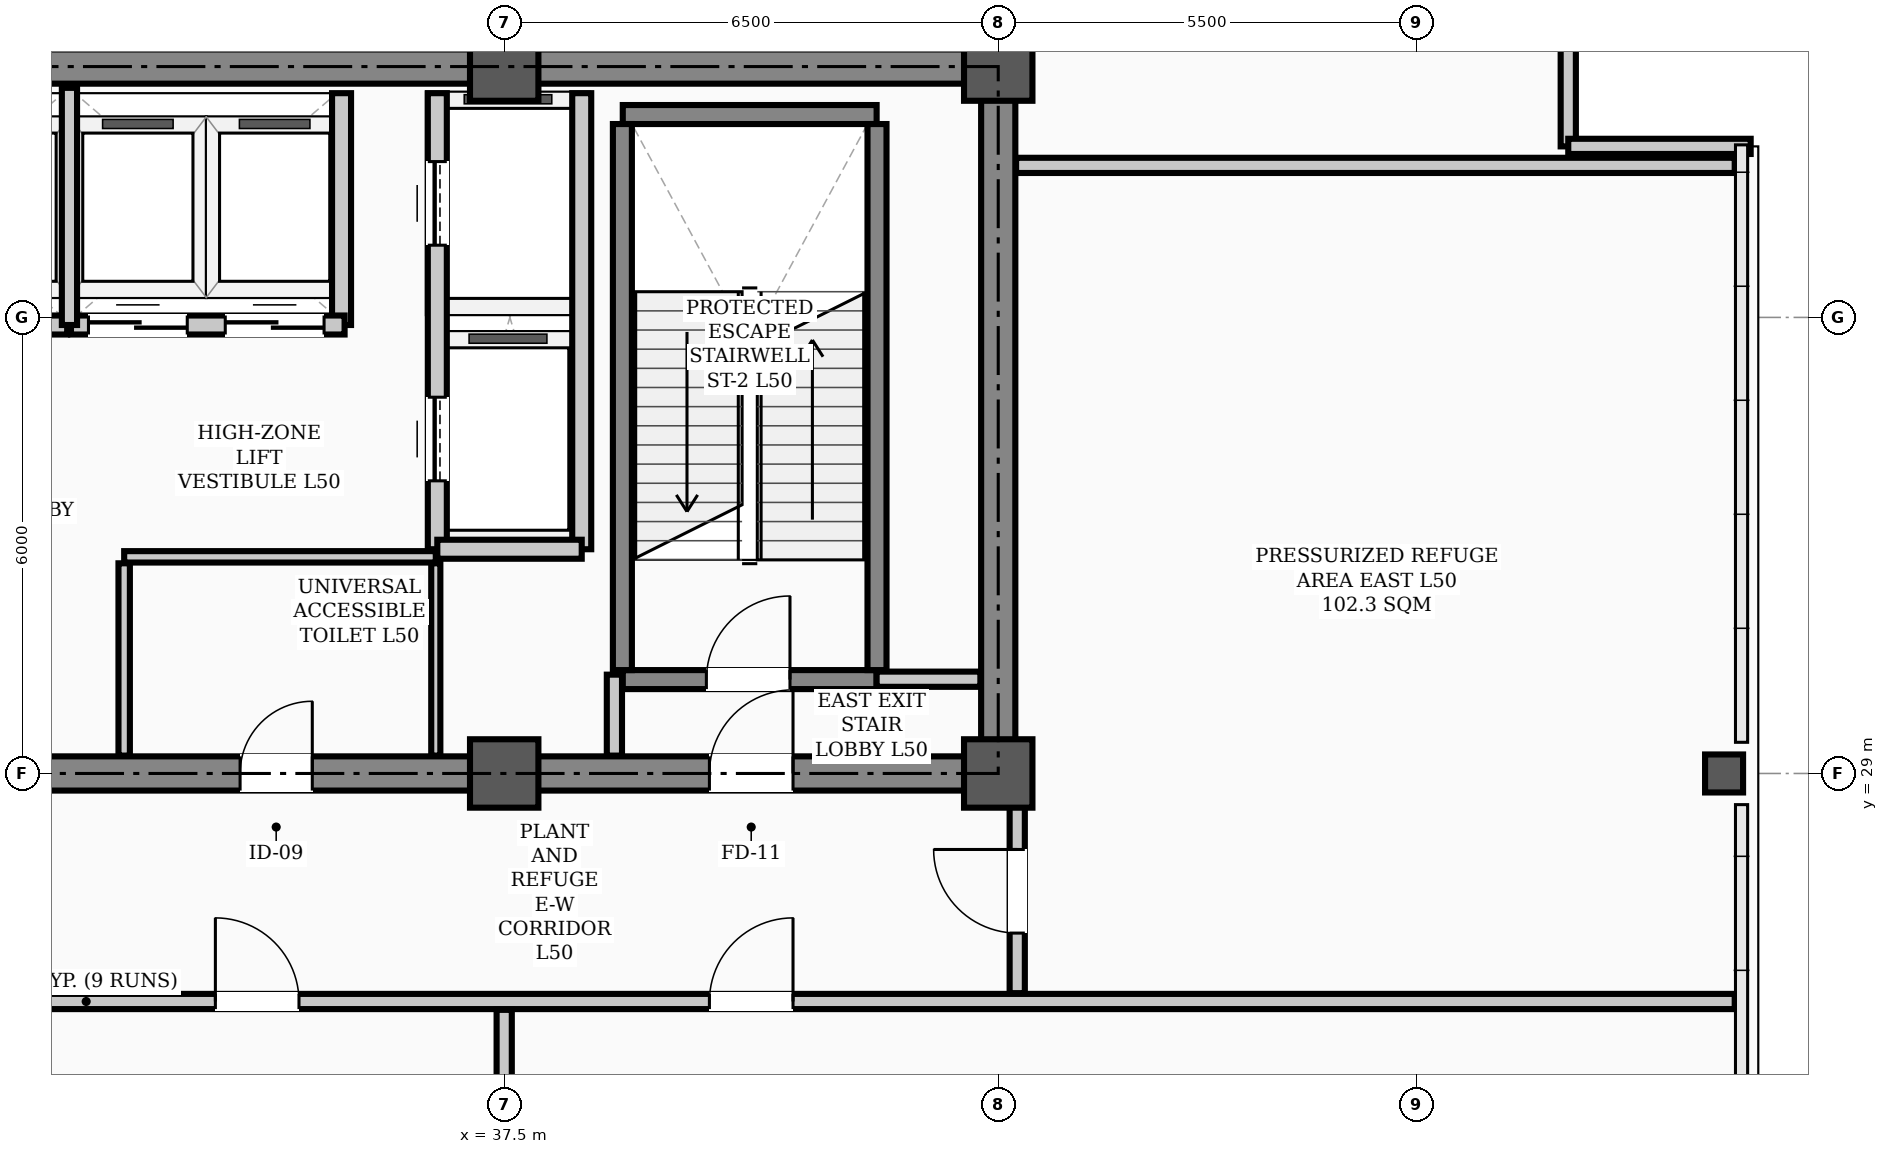
"""IFC4 building model, lengths in metres.
Left out: names, types, materials, properties, quantities, classifications, styles, units other than length and angle.
Written with IfcOpenShell. Run it as: python <this file> out.ifc"""

import sys

from ifc_helpers import new_model, si_unit, direction, frame, frame_2d, origin, origin_2d, place, context, subcontext, project, spatial, rectangle, hollow_rectangle, extrude, element, fill, save


model = new_model("IFC4")
c1 = context("Model", 3, precision=1e-05, world=origin(), true_north=direction((0.0, 1.0)))
c2 = subcontext(c1, "Body", "Model", "MODEL_VIEW")
j1 = project(units=[si_unit("LENGTHUNIT", "METRE"), si_unit("PLANEANGLEUNIT", "RADIAN")], contexts=[c1])
p1 = place(None, origin())
s1 = spatial("IfcSite", under=j1, at=p1, CompositionType="ELEMENT")
p2 = place(p1, origin())
s2 = spatial("IfcBuilding", under=s1, at=p2, CompositionType="ELEMENT")
p3 = place(p2, frame((0.0, 0.0, 200.7)))
s3 = spatial("IfcBuildingStorey", under=s2, at=p3, CompositionType="ELEMENT", Elevation=200.7)
for number, where, z_axis, x_axis in (
    (1, (37.5, 29.0, 0.0), (0.0, 0.0, 1.0), (1.0, 0.0, 0.0)),
    (2, (37.5, 38.3, 0.0), (0.0, 0.0, 1.0), (1.0, 0.0, 0.0)),
    (3, (44.0, 29.0, 0.0), (0.0, 0.0, 1.0), (1.0, 0.0, 0.0)),
    (4, (44.0, 38.3, 0.0), (0.0, 0.0, 1.0), (1.0, 0.0, 0.0)),
):
    element("IfcColumn", number, at=place(p3, frame(where, z_axis=z_axis, x_axis=x_axis)), inside=s3, PredefinedType="COLUMN", context=c2, shape_type="SweptSolid", body=[
        extrude(hollow_rectangle(XDim=0.9, YDim=0.9, WallThickness=0.035, InnerFilletRadius=0.017, OuterFilletRadius=0.052, at=origin_2d()), origin(), (0.0, 0.0, 1.0), 5.4),
    ])
p4 = place(p3, frame((53.55, 29.0, 0.0), z_axis=(0.0, 0.0, 1.0), x_axis=(1.0, 0.0, 0.0)))
e5 = element("IfcColumn", 5, at=p4, inside=s3, PredefinedType="COLUMN", context=c2, shape_type="SweptSolid", body=[
    extrude(hollow_rectangle(XDim=0.5, YDim=0.5, WallThickness=0.024, InnerFilletRadius=0.012, OuterFilletRadius=0.036, at=origin_2d()), origin(), (0.0, 0.0, 1.0), 5.4),
])
for number, where, z_axis, x_axis in (
    (6, (51.5, 39.65, 0.0), (0.0, 0.0, 1.0), (0.0, -1.0, 0.0)),
    (7, (51.5, 37.25, 0.0), (0.0, 0.0, 1.0), (1.0, 0.0, 0.0)),
):
    element("IfcWall", number, at=place(p3, frame(where, z_axis=z_axis, x_axis=x_axis)), inside=s3, PredefinedType="PARAPET", context=c2, shape_type="SweptSolid", body=[
        extrude(rectangle(XDim=2.4, YDim=0.2, at=frame_2d((1.2, 0.0))), origin(), (0.0, 0.0, 1.0), 1.2),
    ])
p5 = place(p3, frame((13.5, 29.0, 0.0), z_axis=(0.0, 0.0, 1.0), x_axis=(1.0, 0.0, 0.0)))
e8 = element("IfcWall", 8, at=p5, inside=s3, PredefinedType="SHEAR", context=c2, shape_type="SweptSolid", body=[
    extrude(rectangle(XDim=30.5, YDim=0.45, at=frame_2d((15.25, 0.0))), origin(), (0.0, 0.0, 1.0), 5.22),
])
p6 = place(p5, frame((1.75, 0.0, 0.0)))
e9 = element("IfcOpeningElement", 9, at=p6, cuts=e8, PredefinedType="OPENING", context=c2, shape_type="SweptSolid", body=[
    extrude(rectangle(XDim=1.1, YDim=2.08, at=frame_2d((0.55, 1.04))), frame((0.0, 0.235, 0.0), z_axis=(0.0, -1.0, 0.0), x_axis=(1.0, 0.0, 0.0)), (0.0, 0.0, 1.0), 0.47),
])
p7 = place(p5, frame((26.7, 0.0, 0.0)))
e10 = element("IfcOpeningElement", 10, at=p7, cuts=e8, PredefinedType="OPENING", context=c2, shape_type="SweptSolid", body=[
    extrude(rectangle(XDim=1.1, YDim=2.08, at=frame_2d((0.55, 1.04))), frame((0.0, 0.235, 0.0), z_axis=(0.0, -1.0, 0.0), x_axis=(1.0, 0.0, 0.0)), (0.0, 0.0, 1.0), 0.47),
])
p8 = place(p5, frame((6.8, 0.0, 0.0)))
e11 = element("IfcOpeningElement", 11, at=p8, cuts=e8, PredefinedType="OPENING", context=c2, shape_type="SweptSolid", body=[
    extrude(rectangle(XDim=1.1, YDim=2.08, at=frame_2d((0.55, 1.04))), frame((0.0, 0.235, 0.0), z_axis=(0.0, -1.0, 0.0), x_axis=(1.0, 0.0, 0.0)), (0.0, 0.0, 1.0), 0.47),
])
p9 = place(p5, frame((13.2, 0.0, 0.0)))
e12 = element("IfcOpeningElement", 12, at=p9, cuts=e8, PredefinedType="OPENING", context=c2, shape_type="SweptSolid", body=[
    extrude(rectangle(XDim=1.6, YDim=2.08, at=frame_2d((0.8, 1.04))), frame((0.0, 0.235, 0.0), z_axis=(0.0, -1.0, 0.0), x_axis=(1.0, 0.0, 0.0)), (0.0, 0.0, 1.0), 0.47),
])
p10 = place(p5, frame((20.525, 0.0, 0.0)))
e13 = element("IfcOpeningElement", 13, at=p10, cuts=e8, PredefinedType="OPENING", context=c2, shape_type="SweptSolid", body=[
    extrude(rectangle(XDim=0.95, YDim=2.08, at=frame_2d((0.475, 1.04))), frame((0.0, 0.235, 0.0), z_axis=(0.0, -1.0, 0.0), x_axis=(1.0, 0.0, 0.0)), (0.0, 0.0, 1.0), 0.47),
])
p11 = place(p3, frame((13.5, 38.3, 0.0), z_axis=(0.0, 0.0, 1.0), x_axis=(1.0, 0.0, 0.0)))
e14 = element("IfcWall", 14, at=p11, inside=s3, PredefinedType="SHEAR", context=c2, shape_type="SweptSolid", body=[
    extrude(rectangle(XDim=30.5, YDim=0.45, at=frame_2d((15.25, 0.0))), origin(), (0.0, 0.0, 1.0), 5.22),
])
p12 = place(p3, frame((44.0, 29.35, 0.0), z_axis=(0.0, 0.0, 1.0), x_axis=(0.0, 1.0, 0.0)))
e15 = element("IfcWall", 15, at=p12, inside=s3, PredefinedType="SHEAR", context=c2, shape_type="SweptSolid", body=[
    extrude(rectangle(XDim=8.6, YDim=0.45, at=frame_2d((4.3, 0.0))), origin(), (0.0, 0.0, 1.0), 5.22),
])
p13 = place(p3, frame((39.06, 30.235, 0.0), z_axis=(0.0, 0.0, 1.0), x_axis=(1.0, 0.0, 0.0)))
e16 = element("IfcWall", 16, at=p13, inside=s3, PredefinedType="STANDARD", context=c2, shape_type="SweptSolid", body=[
    extrude(rectangle(XDim=3.34, YDim=0.25, at=frame_2d((1.67, 0.0))), origin(), (0.0, 0.0, 1.0), 5.22),
])
p14 = place(p13, frame((1.1, 0.0, 0.0)))
e17 = element("IfcOpeningElement", 17, at=p14, cuts=e16, PredefinedType="OPENING", context=c2, shape_type="SweptSolid", body=[
    extrude(rectangle(XDim=1.1, YDim=2.08, at=frame_2d((0.55, 1.04))), frame((0.0, 0.135, 0.0), z_axis=(0.0, -1.0, 0.0), x_axis=(1.0, 0.0, 0.0)), (0.0, 0.0, 1.0), 0.27),
])
p15 = place(p3, frame((39.06, 37.669, 0.0), z_axis=(0.0, 0.0, 1.0), x_axis=(1.0, 0.0, 0.0)))
e18 = element("IfcWall", 18, at=p15, inside=s3, PredefinedType="STANDARD", context=c2, shape_type="SweptSolid", body=[
    extrude(rectangle(XDim=3.34, YDim=0.25, at=frame_2d((1.67, 0.0))), origin(), (0.0, 0.0, 1.0), 5.22),
])
for number, where, z_axis, x_axis in (
    (19, (39.055, 30.36, 0.0), (0.0, 0.0, 1.0), (0.0, 1.0, 0.0)),
    (20, (42.405, 30.36, 0.0), (0.0, 0.0, 1.0), (0.0, 1.0, 0.0)),
):
    element("IfcWall", number, at=place(p3, frame(where, z_axis=z_axis, x_axis=x_axis)), inside=s3, PredefinedType="STANDARD", context=c2, shape_type="SweptSolid", body=[
        extrude(rectangle(XDim=7.184, YDim=0.25, at=frame_2d((3.592, 0.0))), origin(), (0.0, 0.0, 1.0), 5.22),
    ])
p16 = place(p3, frame((36.62, 31.95, 0.0), z_axis=(0.0, 0.0, 1.0), x_axis=(0.0, 1.0, 0.0)))
e21 = element("IfcWall", 21, at=p16, inside=s3, PredefinedType="STANDARD", context=c2, shape_type="SweptSolid", body=[
    extrude(rectangle(XDim=6.0, YDim=0.25, at=frame_2d((3.0, 0.0))), origin(), (0.0, 0.0, 1.0), 5.22),
])
p17 = place(p16, frame((0.9, 0.0, 0.0)))
e22 = element("IfcOpeningElement", 22, at=p17, cuts=e21, PredefinedType="OPENING", context=c2, shape_type="SweptSolid", body=[
    extrude(rectangle(XDim=1.1, YDim=2.08, at=frame_2d((0.55, 1.04))), frame((0.0, 0.135, 0.0), z_axis=(0.0, -1.0, 0.0), x_axis=(1.0, 0.0, 0.0)), (0.0, 0.0, 1.0), 0.27),
])
p18 = place(p16, frame((4.0, 0.0, 0.0)))
e23 = element("IfcOpeningElement", 23, at=p18, cuts=e21, PredefinedType="OPENING", context=c2, shape_type="SweptSolid", body=[
    extrude(rectangle(XDim=1.1, YDim=2.08, at=frame_2d((0.55, 1.04))), frame((0.0, 0.135, 0.0), z_axis=(0.0, -1.0, 0.0), x_axis=(1.0, 0.0, 0.0)), (0.0, 0.0, 1.0), 0.27),
])
p19 = place(p3, frame((38.52, 31.95, 0.0), z_axis=(0.0, 0.0, 1.0), x_axis=(0.0, 1.0, 0.0)))
e24 = element("IfcWall", 24, at=p19, inside=s3, PredefinedType="STANDARD", context=c2, shape_type="SweptSolid", body=[
    extrude(rectangle(XDim=6.0, YDim=0.25, at=frame_2d((3.0, 0.0))), origin(), (0.0, 0.0, 1.0), 4.98),
])
p20 = place(p3, frame((36.62, 31.95, 0.0), z_axis=(0.0, 0.0, 1.0), x_axis=(1.0, 0.0, 0.0)))
e25 = element("IfcWall", 25, at=p20, inside=s3, PredefinedType="STANDARD", context=c2, shape_type="SweptSolid", body=[
    extrude(rectangle(XDim=1.9, YDim=0.25, at=frame_2d((0.95, 0.0))), origin(), (0.0, 0.0, 1.0), 4.98),
])
p21 = place(p3, frame((35.36, 34.9, 0.0), z_axis=(0.0, 0.0, 1.0), x_axis=(0.0, 1.0, 0.0)))
e26 = element("IfcWall", 26, at=p21, inside=s3, PredefinedType="STANDARD", context=c2, shape_type="SweptSolid", body=[
    extrude(rectangle(XDim=3.05, YDim=0.25, at=frame_2d((1.525, 0.0))), origin(), (0.0, 0.0, 1.0), 5.22),
])
p22 = place(p3, frame((28.2, 34.9, 0.0), z_axis=(0.0, 0.0, 1.0), x_axis=(1.0, 0.0, 0.0)))
e27 = element("IfcWall", 27, at=p22, inside=s3, PredefinedType="STANDARD", context=c2, shape_type="SweptSolid", body=[
    extrude(rectangle(XDim=3.55, YDim=0.25, at=frame_2d((1.775, 0.0))), origin(), (0.0, 0.0, 1.0), 5.22),
])
p23 = place(p22, frame((0.23, 0.0, 0.0)))
e28 = element("IfcOpeningElement", 28, at=p23, cuts=e27, PredefinedType="OPENING", context=c2, shape_type="SweptSolid", body=[
    extrude(rectangle(XDim=1.3, YDim=2.08, at=frame_2d((0.65, 1.04))), frame((0.0, 0.135, 0.0), z_axis=(0.0, -1.0, 0.0), x_axis=(1.0, 0.0, 0.0)), (0.0, 0.0, 1.0), 0.27),
])
p24 = place(p22, frame((2.03, 0.0, 0.0)))
e29 = element("IfcOpeningElement", 29, at=p24, cuts=e27, PredefinedType="OPENING", context=c2, shape_type="SweptSolid", body=[
    extrude(rectangle(XDim=1.3, YDim=2.08, at=frame_2d((0.65, 1.04))), frame((0.0, 0.135, 0.0), z_axis=(0.0, -1.0, 0.0), x_axis=(1.0, 0.0, 0.0)), (0.0, 0.0, 1.0), 0.27),
])
p25 = place(p3, frame((31.8, 34.9, 0.0), z_axis=(0.0, 0.0, 1.0), x_axis=(1.0, 0.0, 0.0)))
e30 = element("IfcWall", 30, at=p25, inside=s3, PredefinedType="STANDARD", context=c2, shape_type="SweptSolid", body=[
    extrude(rectangle(XDim=3.6, YDim=0.25, at=frame_2d((1.8, 0.0))), origin(), (0.0, 0.0, 1.0), 5.22),
])
p26 = place(p25, frame((0.23, 0.0, 0.0)))
e31 = element("IfcOpeningElement", 31, at=p26, cuts=e30, PredefinedType="OPENING", context=c2, shape_type="SweptSolid", body=[
    extrude(rectangle(XDim=1.3, YDim=2.08, at=frame_2d((0.65, 1.04))), frame((0.0, 0.135, 0.0), z_axis=(0.0, -1.0, 0.0), x_axis=(1.0, 0.0, 0.0)), (0.0, 0.0, 1.0), 0.27),
])
p27 = place(p25, frame((2.03, 0.0, 0.0)))
e32 = element("IfcOpeningElement", 32, at=p27, cuts=e30, PredefinedType="OPENING", context=c2, shape_type="SweptSolid", body=[
    extrude(rectangle(XDim=1.3, YDim=2.08, at=frame_2d((0.65, 1.04))), frame((0.0, 0.135, 0.0), z_axis=(0.0, -1.0, 0.0), x_axis=(1.0, 0.0, 0.0)), (0.0, 0.0, 1.0), 0.27),
])
p28 = place(p3, frame((42.4, 30.24, 0.0), z_axis=(0.0, 0.0, 1.0), x_axis=(1.0, 0.0, 0.0)))
e33 = element("IfcWall", 33, at=p28, inside=s3, PredefinedType="STANDARD", context=c2, shape_type="SweptSolid", body=[
    extrude(rectangle(XDim=1.365, YDim=0.2, at=frame_2d((0.683, 0.0))), origin(), (0.0, 0.0, 1.0), 4.7),
])
p29 = place(p3, frame((32.5, 31.85, 0.0), z_axis=(0.0, 0.0, 1.0), x_axis=(1.0, 0.0, 0.0)))
e34 = element("IfcWall", 34, at=p29, inside=s3, PredefinedType="PARTITIONING", context=c2, shape_type="SweptSolid", body=[
    extrude(rectangle(XDim=4.1, YDim=0.15, at=frame_2d((2.05, 0.0))), origin(), (0.0, 0.0, 1.0), 5.22),
])
p30 = place(p3, frame((10.31, 26.0, 0.0), z_axis=(0.0, 0.0, 1.0), x_axis=(1.0, 0.0, 0.0)))
e35 = element("IfcWall", 35, at=p30, inside=s3, PredefinedType="STANDARD", context=c2, shape_type="SweptSolid", body=[
    extrude(rectangle(XDim=43.38, YDim=0.2, at=frame_2d((21.69, 0.0))), origin(), (0.0, 0.0, 1.0), 4.7),
])
p31 = place(p30, frame((8.34, 0.0, 0.0)))
e36 = element("IfcOpeningElement", 36, at=p31, cuts=e35, PredefinedType="OPENING", context=c2, shape_type="SweptSolid", body=[
    extrude(rectangle(XDim=1.1, YDim=2.08, at=frame_2d((0.55, 1.04))), frame((0.0, 0.11, 0.0), z_axis=(0.0, -1.0, 0.0), x_axis=(1.0, 0.0, 0.0)), (0.0, 0.0, 1.0), 0.22),
])
p32 = place(p30, frame((16.39, 0.0, 0.0)))
e37 = element("IfcOpeningElement", 37, at=p32, cuts=e35, PredefinedType="OPENING", context=c2, shape_type="SweptSolid", body=[
    extrude(rectangle(XDim=1.6, YDim=2.08, at=frame_2d((0.8, 1.04))), frame((0.0, 0.11, 0.0), z_axis=(0.0, -1.0, 0.0), x_axis=(1.0, 0.0, 0.0)), (0.0, 0.0, 1.0), 0.22),
])
p33 = place(p30, frame((23.39, 0.0, 0.0)))
e38 = element("IfcOpeningElement", 38, at=p33, cuts=e35, PredefinedType="OPENING", context=c2, shape_type="SweptSolid", body=[
    extrude(rectangle(XDim=1.1, YDim=2.08, at=frame_2d((0.55, 1.04))), frame((0.0, 0.11, 0.0), z_axis=(0.0, -1.0, 0.0), x_axis=(1.0, 0.0, 0.0)), (0.0, 0.0, 1.0), 0.22),
])
p34 = place(p30, frame((29.89, 0.0, 0.0)))
e39 = element("IfcOpeningElement", 39, at=p34, cuts=e35, PredefinedType="OPENING", context=c2, shape_type="SweptSolid", body=[
    extrude(rectangle(XDim=1.1, YDim=2.08, at=frame_2d((0.55, 1.04))), frame((0.0, 0.11, 0.0), z_axis=(0.0, -1.0, 0.0), x_axis=(1.0, 0.0, 0.0)), (0.0, 0.0, 1.0), 0.22),
])
p35 = place(p3, frame((44.235, 37.0, 0.0), z_axis=(0.0, 0.0, 1.0), x_axis=(1.0, 0.0, 0.0)))
e40 = element("IfcWall", 40, at=p35, inside=s3, PredefinedType="STANDARD", context=c2, shape_type="SweptSolid", body=[
    extrude(rectangle(XDim=9.455, YDim=0.2, at=frame_2d((4.728, 0.0))), origin(), (0.0, 0.0, 1.0), 4.7),
])
p36 = place(p3, frame((38.95, 29.235, 0.0), z_axis=(0.0, 0.0, 1.0), x_axis=(0.0, 1.0, 0.0)))
e41 = element("IfcWall", 41, at=p36, inside=s3, PredefinedType="STANDARD", context=c2, shape_type="SweptSolid", body=[
    extrude(rectangle(XDim=1.065, YDim=0.2, at=frame_2d((0.532, 0.0))), origin(), (0.0, 0.0, 1.0), 4.85),
])
p37 = place(p3, frame((32.5, 29.235, 0.0), z_axis=(0.0, 0.0, 1.0), x_axis=(0.0, 1.0, 0.0)))
e42 = element("IfcWall", 42, at=p37, inside=s3, PredefinedType="PARTITIONING", context=c2, shape_type="SweptSolid", body=[
    extrude(rectangle(XDim=2.53, YDim=0.15, at=frame_2d((1.265, 0.0))), origin(), (0.0, 0.0, 1.0), 4.85),
])
p38 = place(p3, frame((36.6, 29.235, 0.0), z_axis=(0.0, 0.0, 1.0), x_axis=(0.0, 1.0, 0.0)))
e43 = element("IfcWall", 43, at=p38, inside=s3, PredefinedType="PARTITIONING", context=c2, shape_type="SweptSolid", body=[
    extrude(rectangle(XDim=2.53, YDim=0.12, at=frame_2d((1.265, 0.0))), origin(), (0.0, 0.0, 1.0), 4.85),
])
p39 = place(p3, frame((44.25, 26.11, 0.0), z_axis=(0.0, 0.0, 1.0), x_axis=(0.0, 1.0, 0.0)))
e44 = element("IfcWall", 44, at=p39, inside=s3, PredefinedType="STANDARD", context=c2, shape_type="SweptSolid", body=[
    extrude(rectangle(XDim=3.24, YDim=0.2, at=frame_2d((1.62, 0.0))), origin(), (0.0, 0.0, 1.0), 4.6),
])
p40 = place(p39, frame((0.79, 0.0, 0.0)))
e45 = element("IfcOpeningElement", 45, at=p40, cuts=e44, PredefinedType="OPENING", context=c2, shape_type="SweptSolid", body=[
    extrude(rectangle(XDim=1.1, YDim=2.08, at=frame_2d((0.55, 1.04))), frame((0.0, 0.11, 0.0), z_axis=(0.0, -1.0, 0.0), x_axis=(1.0, 0.0, 0.0)), (0.0, 0.0, 1.0), 0.22),
])
p41 = place(p3, frame((37.5, 11.56, 0.0), z_axis=(0.0, 0.0, 1.0), x_axis=(0.0, 1.0, 0.0)))
e46 = element("IfcWall", 46, at=p41, inside=s3, PredefinedType="STANDARD", context=c2, shape_type="SweptSolid", body=[
    extrude(rectangle(XDim=14.33, YDim=0.2, at=frame_2d((7.165, 0.0))), origin(), (0.0, 0.0, 1.0), 4.6),
])
p42 = place(p3, frame((31.78, 34.9, 0.0), z_axis=(0.0, 0.0, 1.0), x_axis=(0.0, 1.0, 0.0)))
e47 = element("IfcWall", 47, at=p42, inside=s3, PredefinedType="STANDARD", context=c2, shape_type="SweptSolid", body=[
    extrude(rectangle(XDim=3.12, YDim=0.2, at=frame_2d((1.56, 0.0))), origin(), (0.0, 0.0, 1.0), 5.22),
])
p43 = place(p14, origin())
e48 = element("IfcDoor", 48, at=p43, inside=s3, OperationType="SINGLE_SWING_RIGHT", PredefinedType="DOOR", context=c2, shape_type="SweptSolid", body=[
    extrude(rectangle(XDim=1.1, YDim=2.08, at=frame_2d((0.55, 1.04))), frame((0.0, 0.025, 0.0), z_axis=(0.0, -1.0, 0.0), x_axis=(1.0, 0.0, 0.0)), (0.0, 0.0, 1.0), 0.05),
])
fill(e17, e48)
p44 = place(p7, origin())
e49 = element("IfcDoor", 49, at=p44, inside=s3, OperationType="SINGLE_SWING_RIGHT", PredefinedType="DOOR", context=c2, shape_type="SweptSolid", body=[
    extrude(rectangle(XDim=1.1, YDim=2.08, at=frame_2d((0.55, 1.04))), frame((0.0, 0.025, 0.0), z_axis=(0.0, -1.0, 0.0), x_axis=(1.0, 0.0, 0.0)), (0.0, 0.0, 1.0), 0.05),
])
fill(e10, e49)
p45 = place(p10, origin())
e50 = element("IfcDoor", 50, at=p45, inside=s3, OperationType="SINGLE_SWING_RIGHT", PredefinedType="DOOR", context=c2, shape_type="SweptSolid", body=[
    extrude(rectangle(XDim=0.95, YDim=2.08, at=frame_2d((0.475, 1.04))), frame((0.0, 0.025, 0.0), z_axis=(0.0, -1.0, 0.0), x_axis=(1.0, 0.0, 0.0)), (0.0, 0.0, 1.0), 0.05),
])
fill(e13, e50)
p46 = place(p40, origin())
e51 = element("IfcDoor", 51, at=p46, inside=s3, OperationType="SINGLE_SWING_RIGHT", PredefinedType="DOOR", context=c2, shape_type="SweptSolid", body=[
    extrude(rectangle(XDim=1.1, YDim=2.08, at=frame_2d((0.55, 1.04))), frame((0.0, 0.025, 0.0), z_axis=(0.0, -1.0, 0.0), x_axis=(1.0, 0.0, 0.0)), (0.0, 0.0, 1.0), 0.05),
])
fill(e45, e51)
p47 = place(p33, origin())
e52 = element("IfcDoor", 52, at=p47, inside=s3, OperationType="SINGLE_SWING_LEFT", PredefinedType="DOOR", context=c2, shape_type="SweptSolid", body=[
    extrude(rectangle(XDim=1.1, YDim=2.08, at=frame_2d((0.55, 1.04))), frame((0.0, 0.025, 0.0), z_axis=(0.0, -1.0, 0.0), x_axis=(1.0, 0.0, 0.0)), (0.0, 0.0, 1.0), 0.05),
])
fill(e38, e52)
p48 = place(p34, origin())
e53 = element("IfcDoor", 53, at=p48, inside=s3, OperationType="SINGLE_SWING_RIGHT", PredefinedType="DOOR", context=c2, shape_type="SweptSolid", body=[
    extrude(rectangle(XDim=1.1, YDim=2.08, at=frame_2d((0.55, 1.04))), frame((0.0, 0.025, 0.0), z_axis=(0.0, -1.0, 0.0), x_axis=(1.0, 0.0, 0.0)), (0.0, 0.0, 1.0), 0.05),
])
fill(e39, e53)
p49 = place(p17, origin())
e54 = element("IfcDoor", 54, at=p49, inside=s3, OperationType="SLIDING_TO_LEFT", PredefinedType="DOOR", context=c2, shape_type="SweptSolid", body=[
    extrude(rectangle(XDim=1.1, YDim=2.08, at=frame_2d((0.55, 1.04))), frame((0.0, 0.025, 0.0), z_axis=(0.0, -1.0, 0.0), x_axis=(1.0, 0.0, 0.0)), (0.0, 0.0, 1.0), 0.05),
])
fill(e22, e54)
p50 = place(p18, origin())
e55 = element("IfcDoor", 55, at=p50, inside=s3, OperationType="SLIDING_TO_LEFT", PredefinedType="DOOR", context=c2, shape_type="SweptSolid", body=[
    extrude(rectangle(XDim=1.1, YDim=2.08, at=frame_2d((0.55, 1.04))), frame((0.0, 0.025, 0.0), z_axis=(0.0, -1.0, 0.0), x_axis=(1.0, 0.0, 0.0)), (0.0, 0.0, 1.0), 0.05),
])
fill(e23, e55)
p51 = place(p26, origin())
e56 = element("IfcDoor", 56, at=p51, inside=s3, OperationType="DOUBLE_DOOR_SLIDING", PredefinedType="DOOR", context=c2, shape_type="SweptSolid", body=[
    extrude(rectangle(XDim=1.3, YDim=2.08, at=frame_2d((0.65, 1.04))), frame((0.0, 0.025, 0.0), z_axis=(0.0, -1.0, 0.0), x_axis=(1.0, 0.0, 0.0)), (0.0, 0.0, 1.0), 0.05),
])
fill(e31, e56)
p52 = place(p27, origin())
e57 = element("IfcDoor", 57, at=p52, inside=s3, OperationType="DOUBLE_DOOR_SLIDING", PredefinedType="DOOR", context=c2, shape_type="SweptSolid", body=[
    extrude(rectangle(XDim=1.3, YDim=2.08, at=frame_2d((0.65, 1.04))), frame((0.0, 0.025, 0.0), z_axis=(0.0, -1.0, 0.0), x_axis=(1.0, 0.0, 0.0)), (0.0, 0.0, 1.0), 0.05),
])
fill(e32, e57)
save(model, sys.argv[1])
